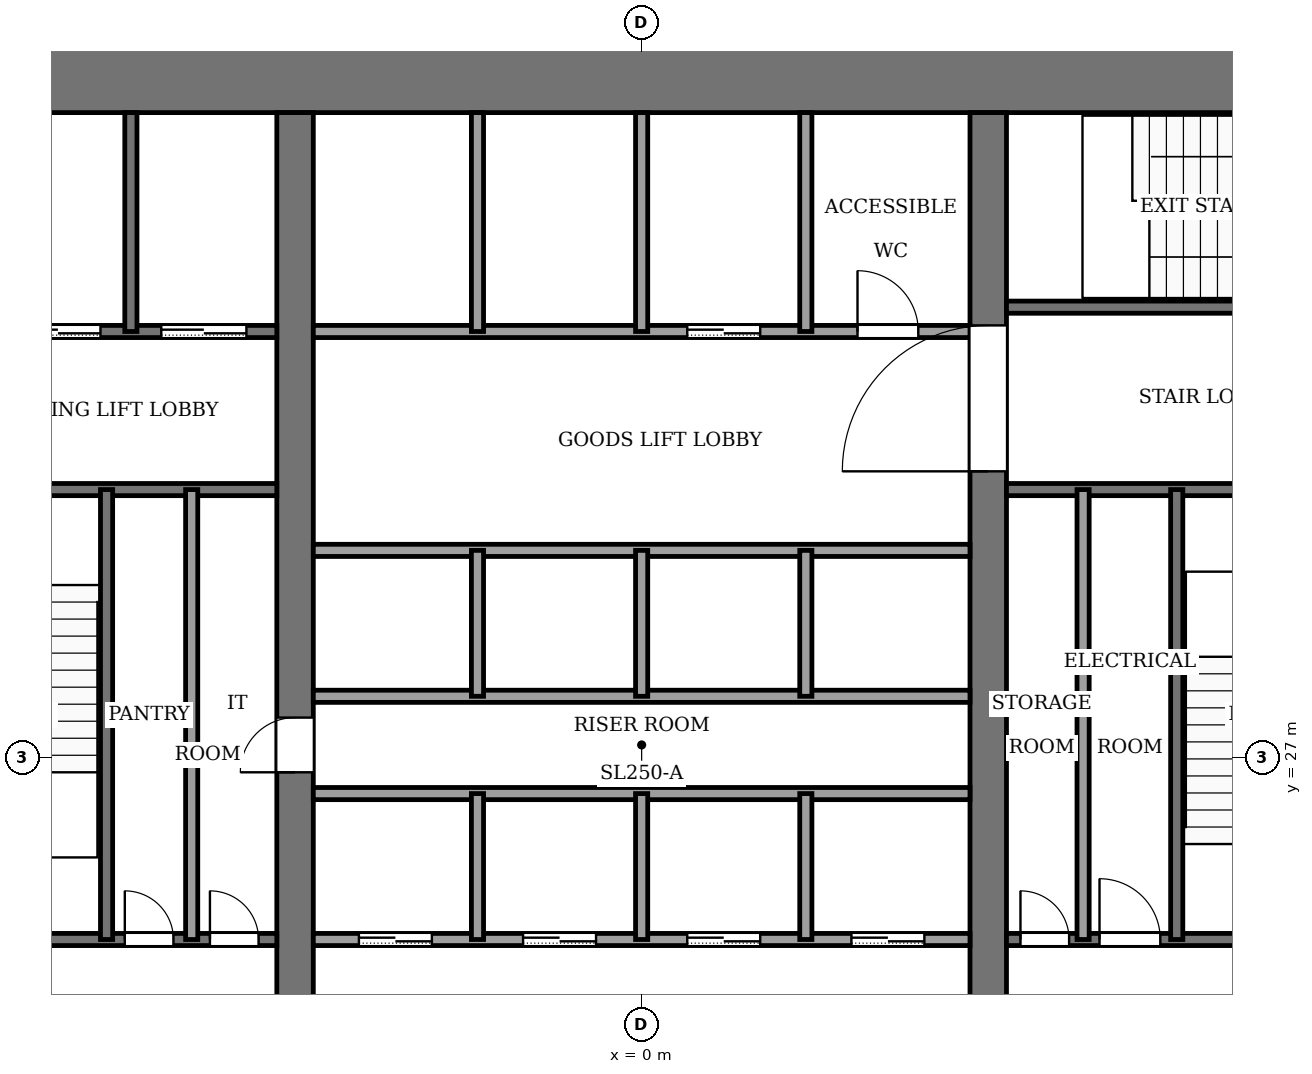
"""IFC4 building model, lengths in metres.
Left out: names, types, materials, properties, quantities, classifications, styles, units other than length and angle.
Written with IfcOpenShell. Run it as: python <this file> out.ifc"""

import sys

from ifc_helpers import new_model, si_unit, direction, frame, frame_2d, origin, place, context, subcontext, project, spatial, rectangle, extrude, element, fill, save


model = new_model("IFC4")
c1 = context("Model", 3, precision=1e-05, world=origin(), true_north=direction((0.0, 1.0)))
c2 = subcontext(c1, "Body", "Model", "MODEL_VIEW")
j1 = project(units=[si_unit("LENGTHUNIT", "METRE"), si_unit("PLANEANGLEUNIT", "RADIAN")], contexts=[c1])
p1 = place(None, origin())
s1 = spatial("IfcSite", under=j1, at=p1, CompositionType="ELEMENT")
p2 = place(p1, origin())
s2 = spatial("IfcBuilding", under=s1, at=p2, CompositionType="ELEMENT")
p3 = place(p2, frame((0.0, 0.0, 102.0)))
s3 = spatial("IfcBuildingStorey", under=s2, at=p3, CompositionType="ELEMENT", Elevation=102.0)
p4 = place(p3, frame((-13.8, 38.2, -0.13), z_axis=(0.0, 0.0, 1.0), x_axis=(1.0, 0.0, 0.0)))
e1 = element("IfcWall", 1, at=p4, inside=s3, PredefinedType="SHEAR", context=c2, shape_type="SweptSolid", body=[
    extrude(rectangle(XDim=27.6, YDim=1.2, at=frame_2d((13.8, 0.0))), origin(), (0.0, 0.0, 1.0), 4.0),
])
p5 = place(p3, frame((-5.7, 18.4, -0.13), z_axis=(0.0, 0.0, 1.0), x_axis=(0.0, 1.0, 0.0)))
e2 = element("IfcWall", 2, at=p5, inside=s3, PredefinedType="SHEAR", context=c2, shape_type="SweptSolid", body=[
    extrude(rectangle(XDim=19.2, YDim=0.6, at=frame_2d((9.6, 0.0))), origin(), (0.0, 0.0, 1.0), 4.0),
])
p6 = place(p5, frame((8.35, 0.0, 0.13)))
e3 = element("IfcOpeningElement", 3, at=p6, cuts=e2, PredefinedType="OPENING", context=c2, shape_type="SweptSolid", body=[
    extrude(rectangle(XDim=0.9, YDim=2.1, at=frame_2d((0.45, 1.05))), frame((0.0, 0.31, 0.0), z_axis=(0.0, -1.0, 0.0), x_axis=(1.0, 0.0, 0.0)), (0.0, 0.0, 1.0), 0.62),
])
p7 = place(p3, frame((5.7, 18.4, -0.13), z_axis=(0.0, 0.0, 1.0), x_axis=(0.0, 1.0, 0.0)))
e4 = element("IfcWall", 4, at=p7, inside=s3, PredefinedType="SHEAR", context=c2, shape_type="SweptSolid", body=[
    extrude(rectangle(XDim=19.2, YDim=0.6, at=frame_2d((9.6, 0.0))), origin(), (0.0, 0.0, 1.0), 4.0),
])
p8 = place(p7, frame((13.3, 0.0, 0.13)))
e5 = element("IfcOpeningElement", 5, at=p8, cuts=e4, PredefinedType="OPENING", context=c2, shape_type="SweptSolid", body=[
    extrude(rectangle(XDim=2.4, YDim=2.4, at=frame_2d((1.2, 1.2))), frame((0.0, 0.31, 0.0), z_axis=(0.0, -1.0, 0.0), x_axis=(1.0, 0.0, 0.0)), (0.0, 0.0, 1.0), 0.62),
])
p9 = place(p3, frame((-12.6, 24.0, 0.0), z_axis=(0.0, 0.0, 1.0), x_axis=(1.0, 0.0, 0.0)))
e6 = element("IfcWall", 6, at=p9, inside=s3, PredefinedType="PARTITIONING", context=c2, shape_type="SweptSolid", body=[
    extrude(rectangle(XDim=6.6, YDim=0.2, at=frame_2d((3.3, 0.0))), origin(), (0.0, 0.0, 1.0), 3.87),
])
p10 = place(p9, frame((4.1, 0.0, 0.0)))
e7 = element("IfcOpeningElement", 7, at=p10, cuts=e6, PredefinedType="OPENING", context=c2, shape_type="SweptSolid", body=[
    extrude(rectangle(XDim=0.8, YDim=2.1, at=frame_2d((0.4, 1.05))), frame((0.0, 0.11, 0.0), z_axis=(0.0, -1.0, 0.0), x_axis=(1.0, 0.0, 0.0)), (0.0, 0.0, 1.0), 0.22),
])
p11 = place(p9, frame((5.5, 0.0, 0.0)))
e8 = element("IfcOpeningElement", 8, at=p11, cuts=e6, PredefinedType="OPENING", context=c2, shape_type="SweptSolid", body=[
    extrude(rectangle(XDim=0.8, YDim=2.1, at=frame_2d((0.4, 1.05))), frame((0.0, 0.11, 0.0), z_axis=(0.0, -1.0, 0.0), x_axis=(1.0, 0.0, 0.0)), (0.0, 0.0, 1.0), 0.22),
])
p12 = place(p3, frame((-5.4, 24.0, 0.0), z_axis=(0.0, 0.0, 1.0), x_axis=(1.0, 0.0, 0.0)))
e9 = element("IfcWall", 9, at=p12, inside=s3, PredefinedType="PARTITIONING", context=c2, shape_type="SweptSolid", body=[
    extrude(rectangle(XDim=10.8, YDim=0.2, at=frame_2d((5.4, 0.0))), origin(), (0.0, 0.0, 1.0), 3.87),
])
p13 = place(p12, frame((0.75, 0.0, 0.0)))
e10 = element("IfcOpeningElement", 10, at=p13, cuts=e9, PredefinedType="OPENING", context=c2, shape_type="SweptSolid", body=[
    extrude(rectangle(XDim=1.2, YDim=2.2, at=frame_2d((0.6, 1.1))), frame((0.0, 0.11, 0.0), z_axis=(0.0, -1.0, 0.0), x_axis=(1.0, 0.0, 0.0)), (0.0, 0.0, 1.0), 0.22),
])
p14 = place(p12, frame((3.45, 0.0, 0.0)))
e11 = element("IfcOpeningElement", 11, at=p14, cuts=e9, PredefinedType="OPENING", context=c2, shape_type="SweptSolid", body=[
    extrude(rectangle(XDim=1.2, YDim=2.2, at=frame_2d((0.6, 1.1))), frame((0.0, 0.11, 0.0), z_axis=(0.0, -1.0, 0.0), x_axis=(1.0, 0.0, 0.0)), (0.0, 0.0, 1.0), 0.22),
])
p15 = place(p12, frame((6.15, 0.0, 0.0)))
e12 = element("IfcOpeningElement", 12, at=p15, cuts=e9, PredefinedType="OPENING", context=c2, shape_type="SweptSolid", body=[
    extrude(rectangle(XDim=1.2, YDim=2.2, at=frame_2d((0.6, 1.1))), frame((0.0, 0.11, 0.0), z_axis=(0.0, -1.0, 0.0), x_axis=(1.0, 0.0, 0.0)), (0.0, 0.0, 1.0), 0.22),
])
p16 = place(p12, frame((8.85, 0.0, 0.0)))
e13 = element("IfcOpeningElement", 13, at=p16, cuts=e9, PredefinedType="OPENING", context=c2, shape_type="SweptSolid", body=[
    extrude(rectangle(XDim=1.2, YDim=2.2, at=frame_2d((0.6, 1.1))), frame((0.0, 0.11, 0.0), z_axis=(0.0, -1.0, 0.0), x_axis=(1.0, 0.0, 0.0)), (0.0, 0.0, 1.0), 0.22),
])
p17 = place(p3, frame((6.0, 24.0, 0.0), z_axis=(0.0, 0.0, 1.0), x_axis=(1.0, 0.0, 0.0)))
e14 = element("IfcWall", 14, at=p17, inside=s3, PredefinedType="PARTITIONING", context=c2, shape_type="SweptSolid", body=[
    extrude(rectangle(XDim=6.6, YDim=0.2, at=frame_2d((3.3, 0.0))), origin(), (0.0, 0.0, 1.0), 3.87),
])
p18 = place(p17, frame((0.23, 0.0, 0.0)))
e15 = element("IfcOpeningElement", 15, at=p18, cuts=e14, PredefinedType="OPENING", context=c2, shape_type="SweptSolid", body=[
    extrude(rectangle(XDim=0.8, YDim=2.1, at=frame_2d((0.4, 1.05))), frame((0.0, 0.11, 0.0), z_axis=(0.0, -1.0, 0.0), x_axis=(1.0, 0.0, 0.0)), (0.0, 0.0, 1.0), 0.22),
])
p19 = place(p17, frame((1.53, 0.0, 0.0)))
e16 = element("IfcOpeningElement", 16, at=p19, cuts=e14, PredefinedType="OPENING", context=c2, shape_type="SweptSolid", body=[
    extrude(rectangle(XDim=1.0, YDim=2.1, at=frame_2d((0.5, 1.05))), frame((0.0, 0.11, 0.0), z_axis=(0.0, -1.0, 0.0), x_axis=(1.0, 0.0, 0.0)), (0.0, 0.0, 1.0), 0.22),
])
p20 = place(p17, frame((4.4, 0.0, 0.0)))
e17 = element("IfcOpeningElement", 17, at=p20, cuts=e14, PredefinedType="OPENING", context=c2, shape_type="SweptSolid", body=[
    extrude(rectangle(XDim=1.2, YDim=2.2, at=frame_2d((0.6, 1.1))), frame((0.0, 0.11, 0.0), z_axis=(0.0, -1.0, 0.0), x_axis=(1.0, 0.0, 0.0)), (0.0, 0.0, 1.0), 0.22),
])
for number, where, z_axis, x_axis in (
    (18, (-5.4, 26.4, 0.0), (0.0, 0.0, 1.0), (1.0, 0.0, 0.0)),
    (19, (-5.4, 28.0, 0.0), (0.0, 0.0, 1.0), (1.0, 0.0, 0.0)),
    (20, (-5.4, 30.4, 0.0), (0.0, 0.0, 1.0), (1.0, 0.0, 0.0)),
):
    element("IfcWall", number, at=place(p3, frame(where, z_axis=z_axis, x_axis=x_axis)), inside=s3, PredefinedType="PARTITIONING", context=c2, shape_type="SweptSolid", body=[
        extrude(rectangle(XDim=10.8, YDim=0.2, at=frame_2d((5.4, 0.0))), origin(), (0.0, 0.0, 1.0), 3.87),
    ])
p21 = place(p3, frame((-12.6, 31.4, 0.0), z_axis=(0.0, 0.0, 1.0), x_axis=(1.0, 0.0, 0.0)))
e21 = element("IfcWall", 21, at=p21, inside=s3, PredefinedType="PARTITIONING", context=c2, shape_type="SweptSolid", body=[
    extrude(rectangle(XDim=6.6, YDim=0.2, at=frame_2d((3.3, 0.0))), origin(), (0.0, 0.0, 1.0), 3.87),
])
p22 = place(p21, frame((1.0, 0.0, 0.0)))
e22 = element("IfcOpeningElement", 22, at=p22, cuts=e21, PredefinedType="OPENING", context=c2, shape_type="SweptSolid", body=[
    extrude(rectangle(XDim=1.2, YDim=2.2, at=frame_2d((0.6, 1.1))), frame((0.0, 0.11, 0.0), z_axis=(0.0, -1.0, 0.0), x_axis=(1.0, 0.0, 0.0)), (0.0, 0.0, 1.0), 0.22),
])
p23 = place(p3, frame((6.0, 31.4, 0.0), z_axis=(0.0, 0.0, 1.0), x_axis=(1.0, 0.0, 0.0)))
e23 = element("IfcWall", 23, at=p23, inside=s3, PredefinedType="PARTITIONING", context=c2, shape_type="SweptSolid", body=[
    extrude(rectangle(XDim=6.6, YDim=0.2, at=frame_2d((3.3, 0.0))), origin(), (0.0, 0.0, 1.0), 3.87),
])
p24 = place(p3, frame((-12.6, 34.0, 0.0), z_axis=(0.0, 0.0, 1.0), x_axis=(1.0, 0.0, 0.0)))
e24 = element("IfcWall", 24, at=p24, inside=s3, PredefinedType="PARTITIONING", context=c2, shape_type="SweptSolid", body=[
    extrude(rectangle(XDim=6.6, YDim=0.2, at=frame_2d((3.3, 0.0))), origin(), (0.0, 0.0, 1.0), 3.87),
])
p25 = place(p24, frame((4.7, 0.0, 0.0)))
e25 = element("IfcOpeningElement", 25, at=p25, cuts=e24, PredefinedType="OPENING", context=c2, shape_type="SweptSolid", body=[
    extrude(rectangle(XDim=1.4, YDim=2.2, at=frame_2d((0.7, 1.1))), frame((0.0, 0.11, 0.0), z_axis=(0.0, -1.0, 0.0), x_axis=(1.0, 0.0, 0.0)), (0.0, 0.0, 1.0), 0.22),
])
p26 = place(p24, frame((2.3, 0.0, 0.0)))
e26 = element("IfcOpeningElement", 26, at=p26, cuts=e24, PredefinedType="OPENING", context=c2, shape_type="SweptSolid", body=[
    extrude(rectangle(XDim=1.4, YDim=2.2, at=frame_2d((0.7, 1.1))), frame((0.0, 0.11, 0.0), z_axis=(0.0, -1.0, 0.0), x_axis=(1.0, 0.0, 0.0)), (0.0, 0.0, 1.0), 0.22),
])
p27 = place(p24, frame((0.45, 0.0, 0.0)))
e27 = element("IfcOpeningElement", 27, at=p27, cuts=e24, PredefinedType="OPENING", context=c2, shape_type="SweptSolid", body=[
    extrude(rectangle(XDim=0.9, YDim=2.1, at=frame_2d((0.45, 1.05))), frame((0.0, 0.11, 0.0), z_axis=(0.0, -1.0, 0.0), x_axis=(1.0, 0.0, 0.0)), (0.0, 0.0, 1.0), 0.22),
])
p28 = place(p3, frame((-5.4, 34.0, 0.0), z_axis=(0.0, 0.0, 1.0), x_axis=(1.0, 0.0, 0.0)))
e28 = element("IfcWall", 28, at=p28, inside=s3, PredefinedType="PARTITIONING", context=c2, shape_type="SweptSolid", body=[
    extrude(rectangle(XDim=10.8, YDim=0.2, at=frame_2d((5.4, 0.0))), origin(), (0.0, 0.0, 1.0), 3.87),
])
p29 = place(p28, frame((6.15, 0.0, 0.0)))
e29 = element("IfcOpeningElement", 29, at=p29, cuts=e28, PredefinedType="OPENING", context=c2, shape_type="SweptSolid", body=[
    extrude(rectangle(XDim=1.2, YDim=2.2, at=frame_2d((0.6, 1.1))), frame((0.0, 0.11, 0.0), z_axis=(0.0, -1.0, 0.0), x_axis=(1.0, 0.0, 0.0)), (0.0, 0.0, 1.0), 0.22),
])
p30 = place(p28, frame((8.95, 0.0, 0.0)))
e30 = element("IfcOpeningElement", 30, at=p30, cuts=e28, PredefinedType="OPENING", context=c2, shape_type="SweptSolid", body=[
    extrude(rectangle(XDim=1.0, YDim=2.1, at=frame_2d((0.5, 1.05))), frame((0.0, 0.11, 0.0), z_axis=(0.0, -1.0, 0.0), x_axis=(1.0, 0.0, 0.0)), (0.0, 0.0, 1.0), 0.22),
])
p31 = place(p3, frame((6.0, 34.4, 0.0), z_axis=(0.0, 0.0, 1.0), x_axis=(1.0, 0.0, 0.0)))
e31 = element("IfcWall", 31, at=p31, inside=s3, PredefinedType="PARTITIONING", context=c2, shape_type="SweptSolid", body=[
    extrude(rectangle(XDim=6.6, YDim=0.2, at=frame_2d((3.3, 0.0))), origin(), (0.0, 0.0, 1.0), 3.87),
])
p32 = place(p31, frame((4.8, 0.0, 0.0)))
e32 = element("IfcOpeningElement", 32, at=p32, cuts=e31, PredefinedType="OPENING", context=c2, shape_type="SweptSolid", body=[
    extrude(rectangle(XDim=1.2, YDim=2.2, at=frame_2d((0.6, 1.1))), frame((0.0, 0.11, 0.0), z_axis=(0.0, -1.0, 0.0), x_axis=(1.0, 0.0, 0.0)), (0.0, 0.0, 1.0), 0.22),
])
p33 = place(p3, frame((-8.8, 24.0, 0.0), z_axis=(0.0, 0.0, 1.0), x_axis=(0.0, 1.0, 0.0)))
e33 = element("IfcWall", 33, at=p33, inside=s3, PredefinedType="PARTITIONING", context=c2, shape_type="SweptSolid", body=[
    extrude(rectangle(XDim=7.4, YDim=0.2, at=frame_2d((3.7, 0.0))), origin(), (0.0, 0.0, 1.0), 3.87),
])
p34 = place(p3, frame((-8.4, 34.0, 0.0), z_axis=(0.0, 0.0, 1.0), x_axis=(0.0, 1.0, 0.0)))
e34 = element("IfcWall", 34, at=p34, inside=s3, PredefinedType="PARTITIONING", context=c2, shape_type="SweptSolid", body=[
    extrude(rectangle(XDim=3.6, YDim=0.2, at=frame_2d((1.8, 0.0))), origin(), (0.0, 0.0, 1.0), 3.87),
])
p35 = place(p3, frame((-7.4, 24.0, 0.0), z_axis=(0.0, 0.0, 1.0), x_axis=(0.0, 1.0, 0.0)))
e35 = element("IfcWall", 35, at=p35, inside=s3, PredefinedType="PARTITIONING", context=c2, shape_type="SweptSolid", body=[
    extrude(rectangle(XDim=7.4, YDim=0.2, at=frame_2d((3.7, 0.0))), origin(), (0.0, 0.0, 1.0), 3.87),
])
for number, where, z_axis, x_axis in (
    (36, (-2.7, 24.0, 0.0), (0.0, 0.0, 1.0), (0.0, 1.0, 0.0)),
    (37, (-2.7, 28.0, 0.0), (0.0, 0.0, 1.0), (0.0, 1.0, 0.0)),
):
    element("IfcWall", number, at=place(p3, frame(where, z_axis=z_axis, x_axis=x_axis)), inside=s3, PredefinedType="PARTITIONING", context=c2, shape_type="SweptSolid", body=[
        extrude(rectangle(XDim=2.4, YDim=0.2, at=frame_2d((1.2, 0.0))), origin(), (0.0, 0.0, 1.0), 3.87),
    ])
p36 = place(p3, frame((-2.7, 34.0, 0.0), z_axis=(0.0, 0.0, 1.0), x_axis=(0.0, 1.0, 0.0)))
e38 = element("IfcWall", 38, at=p36, inside=s3, PredefinedType="PARTITIONING", context=c2, shape_type="SweptSolid", body=[
    extrude(rectangle(XDim=3.6, YDim=0.2, at=frame_2d((1.8, 0.0))), origin(), (0.0, 0.0, 1.0), 3.87),
])
for number, where, z_axis, x_axis in (
    (39, (0.0, 24.0, 0.0), (0.0, 0.0, 1.0), (0.0, 1.0, 0.0)),
    (40, (0.0, 28.0, 0.0), (0.0, 0.0, 1.0), (0.0, 1.0, 0.0)),
):
    element("IfcWall", number, at=place(p3, frame(where, z_axis=z_axis, x_axis=x_axis)), inside=s3, PredefinedType="PARTITIONING", context=c2, shape_type="SweptSolid", body=[
        extrude(rectangle(XDim=2.4, YDim=0.2, at=frame_2d((1.2, 0.0))), origin(), (0.0, 0.0, 1.0), 3.87),
    ])
p37 = place(p3, frame((0.0, 34.0, 0.0), z_axis=(0.0, 0.0, 1.0), x_axis=(0.0, 1.0, 0.0)))
e41 = element("IfcWall", 41, at=p37, inside=s3, PredefinedType="PARTITIONING", context=c2, shape_type="SweptSolid", body=[
    extrude(rectangle(XDim=3.6, YDim=0.2, at=frame_2d((1.8, 0.0))), origin(), (0.0, 0.0, 1.0), 3.87),
])
for number, where, z_axis, x_axis in (
    (42, (2.7, 24.0, 0.0), (0.0, 0.0, 1.0), (0.0, 1.0, 0.0)),
    (43, (2.7, 28.0, 0.0), (0.0, 0.0, 1.0), (0.0, 1.0, 0.0)),
):
    element("IfcWall", number, at=place(p3, frame(where, z_axis=z_axis, x_axis=x_axis)), inside=s3, PredefinedType="PARTITIONING", context=c2, shape_type="SweptSolid", body=[
        extrude(rectangle(XDim=2.4, YDim=0.2, at=frame_2d((1.2, 0.0))), origin(), (0.0, 0.0, 1.0), 3.87),
    ])
p38 = place(p3, frame((2.7, 34.0, 0.0), z_axis=(0.0, 0.0, 1.0), x_axis=(0.0, 1.0, 0.0)))
e44 = element("IfcWall", 44, at=p38, inside=s3, PredefinedType="PARTITIONING", context=c2, shape_type="SweptSolid", body=[
    extrude(rectangle(XDim=3.6, YDim=0.2, at=frame_2d((1.8, 0.0))), origin(), (0.0, 0.0, 1.0), 3.87),
])
for number, where, z_axis, x_axis in (
    (45, (7.26, 24.0, 0.0), (0.0, 0.0, 1.0), (0.0, 1.0, 0.0)),
    (46, (8.8, 24.0, 0.0), (0.0, 0.0, 1.0), (0.0, 1.0, 0.0)),
):
    element("IfcWall", number, at=place(p3, frame(where, z_axis=z_axis, x_axis=x_axis)), inside=s3, PredefinedType="PARTITIONING", context=c2, shape_type="SweptSolid", body=[
        extrude(rectangle(XDim=7.4, YDim=0.2, at=frame_2d((3.7, 0.0))), origin(), (0.0, 0.0, 1.0), 3.87),
    ])
p39 = place(p13, origin())
e47 = element("IfcDoor", 47, at=p39, inside=s3, OperationType="SLIDING_TO_LEFT", PredefinedType="DOOR", context=c2, shape_type="SweptSolid", body=[
    extrude(rectangle(XDim=1.2, YDim=2.2, at=frame_2d((0.6, 1.1))), frame((0.0, 0.025, 0.0), z_axis=(0.0, -1.0, 0.0), x_axis=(1.0, 0.0, 0.0)), (0.0, 0.0, 1.0), 0.05),
])
fill(e10, e47)
p40 = place(p14, origin())
e48 = element("IfcDoor", 48, at=p40, inside=s3, OperationType="SLIDING_TO_LEFT", PredefinedType="DOOR", context=c2, shape_type="SweptSolid", body=[
    extrude(rectangle(XDim=1.2, YDim=2.2, at=frame_2d((0.6, 1.1))), frame((0.0, 0.025, 0.0), z_axis=(0.0, -1.0, 0.0), x_axis=(1.0, 0.0, 0.0)), (0.0, 0.0, 1.0), 0.05),
])
fill(e11, e48)
p41 = place(p15, origin())
e49 = element("IfcDoor", 49, at=p41, inside=s3, OperationType="SLIDING_TO_LEFT", PredefinedType="DOOR", context=c2, shape_type="SweptSolid", body=[
    extrude(rectangle(XDim=1.2, YDim=2.2, at=frame_2d((0.6, 1.1))), frame((0.0, 0.025, 0.0), z_axis=(0.0, -1.0, 0.0), x_axis=(1.0, 0.0, 0.0)), (0.0, 0.0, 1.0), 0.05),
])
fill(e12, e49)
p42 = place(p16, origin())
e50 = element("IfcDoor", 50, at=p42, inside=s3, OperationType="SLIDING_TO_LEFT", PredefinedType="DOOR", context=c2, shape_type="SweptSolid", body=[
    extrude(rectangle(XDim=1.2, YDim=2.2, at=frame_2d((0.6, 1.1))), frame((0.0, 0.025, 0.0), z_axis=(0.0, -1.0, 0.0), x_axis=(1.0, 0.0, 0.0)), (0.0, 0.0, 1.0), 0.05),
])
fill(e13, e50)
p43 = place(p29, origin())
e51 = element("IfcDoor", 51, at=p43, inside=s3, OperationType="SLIDING_TO_LEFT", PredefinedType="DOOR", context=c2, shape_type="SweptSolid", body=[
    extrude(rectangle(XDim=1.2, YDim=2.2, at=frame_2d((0.6, 1.1))), frame((0.0, 0.025, 0.0), z_axis=(0.0, -1.0, 0.0), x_axis=(1.0, 0.0, 0.0)), (0.0, 0.0, 1.0), 0.05),
])
fill(e29, e51)
p44 = place(p25, origin())
e52 = element("IfcDoor", 52, at=p44, inside=s3, OperationType="SLIDING_TO_LEFT", PredefinedType="DOOR", context=c2, shape_type="SweptSolid", body=[
    extrude(rectangle(XDim=1.4, YDim=2.2, at=frame_2d((0.7, 1.1))), frame((0.0, 0.025, 0.0), z_axis=(0.0, -1.0, 0.0), x_axis=(1.0, 0.0, 0.0)), (0.0, 0.0, 1.0), 0.05),
])
fill(e25, e52)
p45 = place(p26, origin())
e53 = element("IfcDoor", 53, at=p45, inside=s3, OperationType="SLIDING_TO_LEFT", PredefinedType="DOOR", context=c2, shape_type="SweptSolid", body=[
    extrude(rectangle(XDim=1.4, YDim=2.2, at=frame_2d((0.7, 1.1))), frame((0.0, 0.025, 0.0), z_axis=(0.0, -1.0, 0.0), x_axis=(1.0, 0.0, 0.0)), (0.0, 0.0, 1.0), 0.05),
])
fill(e26, e53)
p46 = place(p10, origin())
e54 = element("IfcDoor", 54, at=p46, inside=s3, OperationType="SINGLE_SWING_LEFT", PredefinedType="DOOR", context=c2, shape_type="SweptSolid", body=[
    extrude(rectangle(XDim=0.8, YDim=2.1, at=frame_2d((0.4, 1.05))), frame((0.0, 0.025, 0.0), z_axis=(0.0, -1.0, 0.0), x_axis=(1.0, 0.0, 0.0)), (0.0, 0.0, 1.0), 0.05),
])
fill(e7, e54)
p47 = place(p11, origin())
e55 = element("IfcDoor", 55, at=p47, inside=s3, OperationType="SINGLE_SWING_RIGHT", PredefinedType="DOOR", context=c2, shape_type="SweptSolid", body=[
    extrude(rectangle(XDim=0.8, YDim=2.1, at=frame_2d((0.4, 1.05))), frame((0.0, 0.025, 0.0), z_axis=(0.0, -1.0, 0.0), x_axis=(1.0, 0.0, 0.0)), (0.0, 0.0, 1.0), 0.05),
])
fill(e8, e55)
p48 = place(p18, origin())
e56 = element("IfcDoor", 56, at=p48, inside=s3, OperationType="SINGLE_SWING_RIGHT", PredefinedType="DOOR", context=c2, shape_type="SweptSolid", body=[
    extrude(rectangle(XDim=0.8, YDim=2.1, at=frame_2d((0.4, 1.05))), frame((0.0, 0.025, 0.0), z_axis=(0.0, -1.0, 0.0), x_axis=(1.0, 0.0, 0.0)), (0.0, 0.0, 1.0), 0.05),
])
fill(e15, e56)
p49 = place(p19, origin())
e57 = element("IfcDoor", 57, at=p49, inside=s3, OperationType="SINGLE_SWING_LEFT", PredefinedType="DOOR", context=c2, shape_type="SweptSolid", body=[
    extrude(rectangle(XDim=1.0, YDim=2.1, at=frame_2d((0.5, 1.05))), frame((0.0, 0.025, 0.0), z_axis=(0.0, -1.0, 0.0), x_axis=(1.0, 0.0, 0.0)), (0.0, 0.0, 1.0), 0.05),
])
fill(e16, e57)
p50 = place(p30, origin())
e58 = element("IfcDoor", 58, at=p50, inside=s3, OperationType="SINGLE_SWING_LEFT", PredefinedType="DOOR", context=c2, shape_type="SweptSolid", body=[
    extrude(rectangle(XDim=1.0, YDim=2.1, at=frame_2d((0.5, 1.05))), frame((0.0, 0.025, 0.0), z_axis=(0.0, -1.0, 0.0), x_axis=(1.0, 0.0, 0.0)), (0.0, 0.0, 1.0), 0.05),
])
fill(e30, e58)
p51 = place(p6, origin())
e59 = element("IfcDoor", 59, at=p51, inside=s3, OperationType="SINGLE_SWING_RIGHT", PredefinedType="DOOR", context=c2, shape_type="SweptSolid", body=[
    extrude(rectangle(XDim=0.9, YDim=2.1, at=frame_2d((0.45, 1.05))), frame((0.0, 0.025, 0.0), z_axis=(0.0, -1.0, 0.0), x_axis=(1.0, 0.0, 0.0)), (0.0, 0.0, 1.0), 0.05),
])
fill(e3, e59)
p52 = place(p8, origin())
e60 = element("IfcDoor", 60, at=p52, inside=s3, OperationType="DOUBLE_DOOR_SINGLE_SWING", PredefinedType="DOOR", context=c2, shape_type="SweptSolid", body=[
    extrude(rectangle(XDim=2.4, YDim=2.4, at=frame_2d((1.2, 1.2))), frame((0.0, 0.025, 0.0), z_axis=(0.0, -1.0, 0.0), x_axis=(1.0, 0.0, 0.0)), (0.0, 0.0, 1.0), 0.05),
])
fill(e5, e60)
save(model, sys.argv[1])
